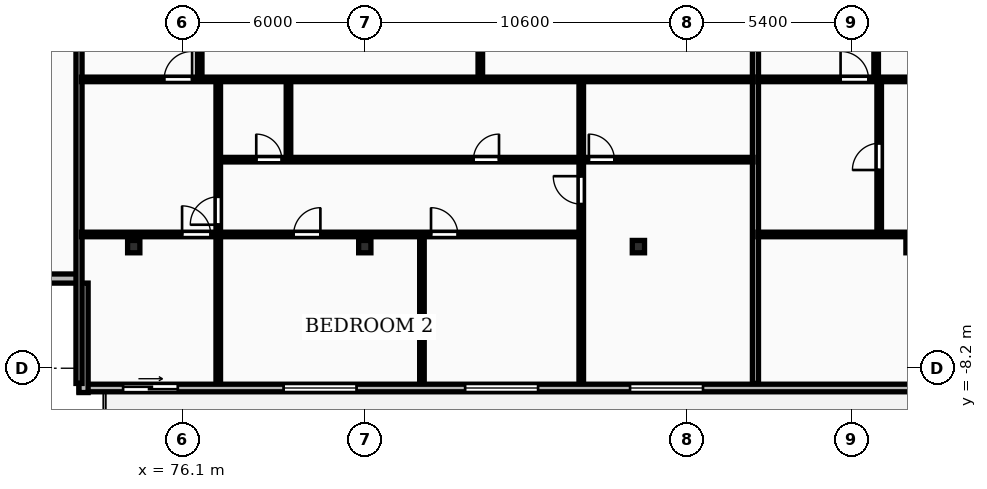
"""IFC4 building model, lengths in metres.
Left out: names, types, materials, properties, quantities, classifications, styles, units other than length and angle.
Written with IfcOpenShell. Run it as: python <this file> out.ifc"""

import sys

from ifc_helpers import new_model, si_unit, direction, frame, frame_2d, origin, origin_2d, place, context, subcontext, project, spatial, rectangle, i_section, extrude, element, fill, save


model = new_model("IFC4")
c1 = context("Model", 3, precision=1e-05, world=origin(), true_north=direction((0.0, 1.0)))
c2 = subcontext(c1, "Body", "Model", "MODEL_VIEW")
j1 = project(units=[si_unit("LENGTHUNIT", "METRE"), si_unit("PLANEANGLEUNIT", "RADIAN")], contexts=[c1])
p1 = place(None, origin())
s1 = spatial("IfcSite", under=j1, at=p1, CompositionType="ELEMENT")
p2 = place(p1, origin())
s2 = spatial("IfcBuilding", under=s1, at=p2, CompositionType="ELEMENT")
p3 = place(p2, frame((0.0, 0.0, 142.9)))
s3 = spatial("IfcBuildingStorey", under=s2, at=p3, CompositionType="ELEMENT", Elevation=142.9)
for number, where, z_axis, x_axis in (
    (1, (74.5, -4.2, 0.0), (0.0, 0.0, 1.0), (1.0, 0.0, 0.0)),
    (2, (82.1, -4.2, 0.0), (0.0, 0.0, 1.0), (1.0, 0.0, 0.0)),
    (3, (91.1, -4.2, 0.0), (0.0, 0.0, 1.0), (1.0, 0.0, 0.0)),
    (4, (100.1, -4.2, 0.0), (0.0, 0.0, 1.0), (1.0, 0.0, 0.0)),
):
    element("IfcColumn", number, at=place(p3, frame(where, z_axis=z_axis, x_axis=x_axis)), inside=s3, PredefinedType="COLUMN", context=c2, shape_type="SweptSolid", body=[
        extrude(i_section(OverallWidth=0.403, OverallDepth=0.406, WebThickness=0.027, FlangeThickness=0.043, FilletRadius=0.015, at=origin_2d()), origin(), (0.0, 0.0, 1.0), 3.6),
    ])
p4 = place(p3, frame((72.7, -8.85, 0.0), z_axis=(0.0, 0.0, 1.0), x_axis=(1.0, 0.0, 0.0)))
e5 = element("IfcWall", 5, at=p4, inside=s3, PredefinedType="STANDARD", context=c2, shape_type="SweptSolid", body=[
    extrude(rectangle(XDim=58.0, YDim=0.25, at=frame_2d((29.0, 0.0))), origin(), (0.0, 0.0, 1.0), 3.31),
])
p5 = place(p4, frame((6.73, 0.0, 0.85)))
e6 = element("IfcOpeningElement", 6, at=p5, cuts=e5, PredefinedType="OPENING", context=c2, shape_type="SweptSolid", body=[
    extrude(rectangle(XDim=2.4, YDim=1.9, at=frame_2d((1.2, 0.95))), frame((0.0, 0.135, 0.0), z_axis=(0.0, -1.0, 0.0), x_axis=(1.0, 0.0, 0.0)), (0.0, 0.0, 1.0), 0.27),
])
p6 = place(p4, frame((12.7, 0.0, 0.85)))
e7 = element("IfcOpeningElement", 7, at=p6, cuts=e5, PredefinedType="OPENING", context=c2, shape_type="SweptSolid", body=[
    extrude(rectangle(XDim=2.4, YDim=1.9, at=frame_2d((1.2, 0.95))), frame((0.0, 0.135, 0.0), z_axis=(0.0, -1.0, 0.0), x_axis=(1.0, 0.0, 0.0)), (0.0, 0.0, 1.0), 0.27),
])
p7 = place(p4, frame((1.45, 0.0, 0.0)))
e8 = element("IfcOpeningElement", 8, at=p7, cuts=e5, PredefinedType="OPENING", context=c2, shape_type="SweptSolid", body=[
    extrude(rectangle(XDim=1.8, YDim=2.2, at=frame_2d((0.9, 1.1))), frame((0.0, 0.135, 0.0), z_axis=(0.0, -1.0, 0.0), x_axis=(1.0, 0.0, 0.0)), (0.0, 0.0, 1.0), 0.27),
])
p8 = place(p4, frame((18.125, 0.0, 0.85)))
e9 = element("IfcOpeningElement", 9, at=p8, cuts=e5, PredefinedType="OPENING", context=c2, shape_type="SweptSolid", body=[
    extrude(rectangle(XDim=2.4, YDim=1.9, at=frame_2d((1.2, 0.95))), frame((0.0, 0.135, 0.0), z_axis=(0.0, -1.0, 0.0), x_axis=(1.0, 0.0, 0.0)), (0.0, 0.0, 1.0), 0.27),
])
p9 = place(p4, frame((27.429, 0.0, 0.0)))
e10 = element("IfcOpeningElement", 10, at=p9, cuts=e5, PredefinedType="OPENING", context=c2, shape_type="SweptSolid", body=[
    extrude(rectangle(XDim=1.8, YDim=2.2, at=frame_2d((0.9, 1.1))), frame((0.0, 0.135, 0.0), z_axis=(0.0, -1.0, 0.0), x_axis=(1.0, 0.0, 0.0)), (0.0, 0.0, 1.0), 0.27),
])
p10 = place(p4, frame((35.038, 0.0, 0.85)))
e11 = element("IfcOpeningElement", 11, at=p10, cuts=e5, PredefinedType="OPENING", context=c2, shape_type="SweptSolid", body=[
    extrude(rectangle(XDim=1.8, YDim=1.8, at=frame_2d((0.9, 0.9))), frame((0.0, 0.135, 0.0), z_axis=(0.0, -1.0, 0.0), x_axis=(1.0, 0.0, 0.0)), (0.0, 0.0, 1.0), 0.27),
])
p11 = place(p4, frame((44.124, 0.0, 0.85)))
e12 = element("IfcOpeningElement", 12, at=p11, cuts=e5, PredefinedType="OPENING", context=c2, shape_type="SweptSolid", body=[
    extrude(rectangle(XDim=2.4, YDim=1.9, at=frame_2d((1.2, 0.95))), frame((0.0, 0.135, 0.0), z_axis=(0.0, -1.0, 0.0), x_axis=(1.0, 0.0, 0.0)), (0.0, 0.0, 1.0), 0.27),
])
p12 = place(p4, frame((49.604, 0.0, 0.85)))
e13 = element("IfcOpeningElement", 13, at=p12, cuts=e5, PredefinedType="OPENING", context=c2, shape_type="SweptSolid", body=[
    extrude(rectangle(XDim=2.4, YDim=1.9, at=frame_2d((1.2, 0.95))), frame((0.0, 0.135, 0.0), z_axis=(0.0, -1.0, 0.0), x_axis=(1.0, 0.0, 0.0)), (0.0, 0.0, 1.0), 0.27),
])
p13 = place(p4, frame((39.368, 0.0, 0.0)))
e14 = element("IfcOpeningElement", 14, at=p13, cuts=e5, PredefinedType="OPENING", context=c2, shape_type="SweptSolid", body=[
    extrude(rectangle(XDim=1.8, YDim=2.2, at=frame_2d((0.9, 1.1))), frame((0.0, 0.135, 0.0), z_axis=(0.0, -1.0, 0.0), x_axis=(1.0, 0.0, 0.0)), (0.0, 0.0, 1.0), 0.27),
])
p14 = place(p4, frame((54.575, 0.0, 0.85)))
e15 = element("IfcOpeningElement", 15, at=p14, cuts=e5, PredefinedType="OPENING", context=c2, shape_type="SweptSolid", body=[
    extrude(rectangle(XDim=2.4, YDim=1.9, at=frame_2d((1.2, 0.95))), frame((0.0, 0.135, 0.0), z_axis=(0.0, -1.0, 0.0), x_axis=(1.0, 0.0, 0.0)), (0.0, 0.0, 1.0), 0.27),
])
p15 = place(p3, frame((69.1, -5.25, 0.0), z_axis=(0.0, 0.0, 1.0), x_axis=(1.0, 0.0, 0.0)))
e16 = element("IfcWall", 16, at=p15, inside=s3, PredefinedType="STANDARD", context=c2, shape_type="SweptSolid", body=[
    extrude(rectangle(XDim=3.6, YDim=0.3, at=frame_2d((1.8, 0.0))), origin(), (0.0, 0.0, 1.0), 3.31),
])
p16 = place(p3, frame((72.85, -5.4, 0.0), z_axis=(0.0, 0.0, 1.0), x_axis=(0.0, -1.0, 0.0)))
e17 = element("IfcWall", 17, at=p16, inside=s3, PredefinedType="STANDARD", context=c2, shape_type="SweptSolid", body=[
    extrude(rectangle(XDim=3.6, YDim=0.3, at=frame_2d((1.8, 0.0))), origin(), (0.0, 0.0, 1.0), 3.31),
])
for number, where, z_axis, x_axis in (
    (18, (72.7, -8.7, 0.0), (0.0, 0.0, 1.0), (0.0, 1.0, 0.0)),
    (19, (94.95, -8.7, 0.0), (0.0, 0.0, 1.0), (0.0, 1.0, 0.0)),
):
    element("IfcWall", number, at=place(p3, frame(where, z_axis=z_axis, x_axis=x_axis)), inside=s3, PredefinedType="PARTITIONING", context=c2, shape_type="SweptSolid", body=[
        extrude(rectangle(XDim=24.57, YDim=0.2, at=frame_2d((12.285, 0.0))), origin(), (0.0, 0.0, 1.0), 3.31),
    ])
p17 = place(p3, frame((85.9, 1.34, 0.0), z_axis=(0.0, 0.0, 1.0), x_axis=(0.0, 1.0, 0.0)))
e20 = element("IfcWall", 20, at=p17, inside=s3, PredefinedType="PARTITIONING", context=c2, shape_type="SweptSolid", body=[
    extrude(rectangle(XDim=14.55, YDim=0.15, at=frame_2d((7.275, 0.0))), origin(), (0.0, 0.0, 1.0), 3.31),
])
p18 = place(p17, frame((6.185, 0.0, 0.0)))
e21 = element("IfcOpeningElement", 21, at=p18, cuts=e20, PredefinedType="OPENING", context=c2, shape_type="SweptSolid", body=[
    extrude(rectangle(XDim=0.84, YDim=2.04, at=frame_2d((0.42, 1.02))), frame((0.0, 0.085, 0.0), z_axis=(0.0, -1.0, 0.0), x_axis=(1.0, 0.0, 0.0)), (0.0, 0.0, 1.0), 0.17),
])
p19 = place(p17, frame((7.525, 0.0, 0.0)))
e22 = element("IfcOpeningElement", 22, at=p19, cuts=e20, PredefinedType="OPENING", context=c2, shape_type="SweptSolid", body=[
    extrude(rectangle(XDim=0.88, YDim=2.06, at=frame_2d((0.44, 1.03))), frame((0.0, 0.085, 0.0), z_axis=(0.0, -1.0, 0.0), x_axis=(1.0, 0.0, 0.0)), (0.0, 0.0, 1.0), 0.17),
])
p20 = place(p3, frame((76.67, 1.34, 0.0), z_axis=(0.0, 0.0, 1.0), x_axis=(0.0, 1.0, 0.0)))
e23 = element("IfcWall", 23, at=p20, inside=s3, PredefinedType="PARTITIONING", context=c2, shape_type="SweptSolid", body=[
    extrude(rectangle(XDim=14.55, YDim=0.15, at=frame_2d((7.275, 0.0))), origin(), (0.0, 0.0, 1.0), 3.31),
])
p21 = place(p20, frame((3.132, 0.0, 0.0)))
e24 = element("IfcOpeningElement", 24, at=p21, cuts=e23, PredefinedType="OPENING", context=c2, shape_type="SweptSolid", body=[
    extrude(rectangle(XDim=0.88, YDim=2.06, at=frame_2d((0.44, 1.03))), frame((0.0, 0.085, 0.0), z_axis=(0.0, -1.0, 0.0), x_axis=(1.0, 0.0, 0.0)), (0.0, 0.0, 1.0), 0.17),
])
p22 = place(p3, frame((79.59, -1.32, 0.0), z_axis=(0.0, 0.0, 1.0), x_axis=(0.0, 1.0, 0.0)))
e25 = element("IfcWall", 25, at=p22, inside=s3, PredefinedType="PARTITIONING", context=c2, shape_type="SweptSolid", body=[
    extrude(rectangle(XDim=2.58, YDim=0.15, at=frame_2d((1.29, 0.0))), origin(), (0.0, 0.0, 1.0), 3.31),
])
p23 = place(p3, frame((83.98, -8.7, 0.0), z_axis=(0.0, 0.0, 1.0), x_axis=(0.0, 1.0, 0.0)))
e26 = element("IfcWall", 26, at=p23, inside=s3, PredefinedType="PARTITIONING", context=c2, shape_type="SweptSolid", body=[
    extrude(rectangle(XDim=4.82, YDim=0.15, at=frame_2d((2.41, 0.0))), origin(), (0.0, 0.0, 1.0), 3.31),
])
p24 = place(p3, frame((77.28, -8.7, 0.0), z_axis=(0.0, 0.0, 1.0), x_axis=(0.0, 1.0, 0.0)))
e27 = element("IfcWall", 27, at=p24, inside=s3, PredefinedType="PARTITIONING", context=c2, shape_type="SweptSolid", body=[
    extrude(rectangle(XDim=9.96, YDim=0.15, at=frame_2d((4.98, 0.0))), origin(), (0.0, 0.0, 1.0), 3.31),
])
p25 = place(p24, frame((5.22, 0.0, 0.0)))
e28 = element("IfcOpeningElement", 28, at=p25, cuts=e27, PredefinedType="OPENING", context=c2, shape_type="SweptSolid", body=[
    extrude(rectangle(XDim=0.92, YDim=2.08, at=frame_2d((0.46, 1.04))), frame((0.0, 0.085, 0.0), z_axis=(0.0, -1.0, 0.0), x_axis=(1.0, 0.0, 0.0)), (0.0, 0.0, 1.0), 0.17),
])
p26 = place(p3, frame((89.22, -1.32, 0.0), z_axis=(0.0, 0.0, 1.0), x_axis=(0.0, 1.0, 0.0)))
e29 = element("IfcWall", 29, at=p26, inside=s3, PredefinedType="PARTITIONING", context=c2, shape_type="SweptSolid", body=[
    extrude(rectangle(XDim=2.58, YDim=0.15, at=frame_2d((1.29, 0.0))), origin(), (0.0, 0.0, 1.0), 3.31),
])
p27 = place(p3, frame((89.22, -8.7, 0.0), z_axis=(0.0, 0.0, 1.0), x_axis=(0.0, 1.0, 0.0)))
e30 = element("IfcWall", 30, at=p27, inside=s3, PredefinedType="PARTITIONING", context=c2, shape_type="SweptSolid", body=[
    extrude(rectangle(XDim=7.34, YDim=0.15, at=frame_2d((3.67, 0.0))), origin(), (0.0, 0.0, 1.0), 3.31),
])
p28 = place(p27, frame((5.897, 0.0, 0.0)))
e31 = element("IfcOpeningElement", 31, at=p28, cuts=e30, PredefinedType="OPENING", context=c2, shape_type="SweptSolid", body=[
    extrude(rectangle(XDim=0.92, YDim=2.08, at=frame_2d((0.46, 1.04))), frame((0.0, 0.085, 0.0), z_axis=(0.0, -1.0, 0.0), x_axis=(1.0, 0.0, 0.0)), (0.0, 0.0, 1.0), 0.17),
])
p29 = place(p3, frame((77.32, -1.34, 0.0), z_axis=(0.0, 0.0, 1.0), x_axis=(1.0, 0.0, 0.0)))
e32 = element("IfcWall", 32, at=p29, inside=s3, PredefinedType="PARTITIONING", context=c2, shape_type="SweptSolid", body=[
    extrude(rectangle(XDim=17.55, YDim=0.15, at=frame_2d((8.775, 0.0))), origin(), (0.0, 0.0, 1.0), 3.31),
])
p30 = place(p29, frame((1.21, 0.0, 0.0)))
e33 = element("IfcOpeningElement", 33, at=p30, cuts=e32, PredefinedType="OPENING", context=c2, shape_type="SweptSolid", body=[
    extrude(rectangle(XDim=0.84, YDim=2.04, at=frame_2d((0.42, 1.02))), frame((0.0, 0.085, 0.0), z_axis=(0.0, -1.0, 0.0), x_axis=(1.0, 0.0, 0.0)), (0.0, 0.0, 1.0), 0.17),
])
p31 = place(p29, frame((8.355, 0.0, 0.0)))
e34 = element("IfcOpeningElement", 34, at=p31, cuts=e32, PredefinedType="OPENING", context=c2, shape_type="SweptSolid", body=[
    extrude(rectangle(XDim=0.84, YDim=2.04, at=frame_2d((0.42, 1.02))), frame((0.0, 0.085, 0.0), z_axis=(0.0, -1.0, 0.0), x_axis=(1.0, 0.0, 0.0)), (0.0, 0.0, 1.0), 0.17),
])
p32 = place(p29, frame((12.15, 0.0, 0.0)))
e35 = element("IfcOpeningElement", 35, at=p32, cuts=e32, PredefinedType="OPENING", context=c2, shape_type="SweptSolid", body=[
    extrude(rectangle(XDim=0.84, YDim=2.04, at=frame_2d((0.42, 1.02))), frame((0.0, 0.085, 0.0), z_axis=(0.0, -1.0, 0.0), x_axis=(1.0, 0.0, 0.0)), (0.0, 0.0, 1.0), 0.17),
])
p33 = place(p3, frame((72.78, 1.3, 0.0), z_axis=(0.0, 0.0, 1.0), x_axis=(1.0, 0.0, 0.0)))
e36 = element("IfcWall", 36, at=p33, inside=s3, PredefinedType="PARTITIONING", context=c2, shape_type="SweptSolid", body=[
    extrude(rectangle(XDim=22.09, YDim=0.15, at=frame_2d((11.045, 0.0))), origin(), (0.0, 0.0, 1.0), 3.31),
])
p34 = place(p33, frame((2.72, 0.0, 0.0)))
e37 = element("IfcOpeningElement", 37, at=p34, cuts=e36, PredefinedType="OPENING", context=c2, shape_type="SweptSolid", body=[
    extrude(rectangle(XDim=0.92, YDim=2.08, at=frame_2d((0.46, 1.04))), frame((0.0, 0.085, 0.0), z_axis=(0.0, -1.0, 0.0), x_axis=(1.0, 0.0, 0.0)), (0.0, 0.0, 1.0), 0.17),
])
p35 = place(p3, frame((72.78, -3.8, 0.0), z_axis=(0.0, 0.0, 1.0), x_axis=(1.0, 0.0, 0.0)))
e38 = element("IfcWall", 38, at=p35, inside=s3, PredefinedType="PARTITIONING", context=c2, shape_type="SweptSolid", body=[
    extrude(rectangle(XDim=16.44, YDim=0.15, at=frame_2d((8.22, 0.0))), origin(), (0.0, 0.0, 1.0), 3.31),
])
p36 = place(p35, frame((3.31, 0.0, 0.0)))
e39 = element("IfcOpeningElement", 39, at=p36, cuts=e38, PredefinedType="OPENING", context=c2, shape_type="SweptSolid", body=[
    extrude(rectangle(XDim=0.94, YDim=2.1, at=frame_2d((0.47, 1.05))), frame((0.0, 0.085, 0.0), z_axis=(0.0, -1.0, 0.0), x_axis=(1.0, 0.0, 0.0)), (0.0, 0.0, 1.0), 0.17),
])
p37 = place(p35, frame((6.979, 0.0, 0.0)))
e40 = element("IfcOpeningElement", 40, at=p37, cuts=e38, PredefinedType="OPENING", context=c2, shape_type="SweptSolid", body=[
    extrude(rectangle(XDim=0.88, YDim=2.06, at=frame_2d((0.44, 1.03))), frame((0.0, 0.085, 0.0), z_axis=(0.0, -1.0, 0.0), x_axis=(1.0, 0.0, 0.0)), (0.0, 0.0, 1.0), 0.17),
])
p38 = place(p35, frame((11.498, 0.0, 0.0)))
e41 = element("IfcOpeningElement", 41, at=p38, cuts=e38, PredefinedType="OPENING", context=c2, shape_type="SweptSolid", body=[
    extrude(rectangle(XDim=0.88, YDim=2.06, at=frame_2d((0.44, 1.03))), frame((0.0, 0.085, 0.0), z_axis=(0.0, -1.0, 0.0), x_axis=(1.0, 0.0, 0.0)), (0.0, 0.0, 1.0), 0.17),
])
p39 = place(p3, frame((98.92, 1.34, 0.0), z_axis=(0.0, 0.0, 1.0), x_axis=(0.0, 1.0, 0.0)))
e42 = element("IfcWall", 42, at=p39, inside=s3, PredefinedType="PARTITIONING", context=c2, shape_type="SweptSolid", body=[
    extrude(rectangle(XDim=14.55, YDim=0.15, at=frame_2d((7.275, 0.0))), origin(), (0.0, 0.0, 1.0), 3.31),
])
p40 = place(p39, frame((3.098, 0.0, 0.0)))
e43 = element("IfcOpeningElement", 43, at=p40, cuts=e42, PredefinedType="OPENING", context=c2, shape_type="SweptSolid", body=[
    extrude(rectangle(XDim=0.88, YDim=2.06, at=frame_2d((0.44, 1.03))), frame((0.0, 0.085, 0.0), z_axis=(0.0, -1.0, 0.0), x_axis=(1.0, 0.0, 0.0)), (0.0, 0.0, 1.0), 0.17),
])
p41 = place(p3, frame((99.02, -3.74, 0.0), z_axis=(0.0, 0.0, 1.0), x_axis=(0.0, 1.0, 0.0)))
e44 = element("IfcWall", 44, at=p41, inside=s3, PredefinedType="PARTITIONING", context=c2, shape_type="SweptSolid", body=[
    extrude(rectangle(XDim=5.0, YDim=0.15, at=frame_2d((2.5, 0.0))), origin(), (0.0, 0.0, 1.0), 3.31),
])
p42 = place(p41, frame((2.06, 0.0, 0.0)))
e45 = element("IfcOpeningElement", 45, at=p42, cuts=e44, PredefinedType="OPENING", context=c2, shape_type="SweptSolid", body=[
    extrude(rectangle(XDim=0.88, YDim=2.06, at=frame_2d((0.44, 1.03))), frame((0.0, 0.085, 0.0), z_axis=(0.0, -1.0, 0.0), x_axis=(1.0, 0.0, 0.0)), (0.0, 0.0, 1.0), 0.17),
])
p43 = place(p3, frame((95.03, 1.3, 0.0), z_axis=(0.0, 0.0, 1.0), x_axis=(1.0, 0.0, 0.0)))
e46 = element("IfcWall", 46, at=p43, inside=s3, PredefinedType="PARTITIONING", context=c2, shape_type="SweptSolid", body=[
    extrude(rectangle(XDim=15.298, YDim=0.15, at=frame_2d((7.649, 0.0))), origin(), (0.0, 0.0, 1.0), 3.31),
])
p44 = place(p43, frame((2.72, 0.0, 0.0)))
e47 = element("IfcOpeningElement", 47, at=p44, cuts=e46, PredefinedType="OPENING", context=c2, shape_type="SweptSolid", body=[
    extrude(rectangle(XDim=0.92, YDim=2.08, at=frame_2d((0.46, 1.04))), frame((0.0, 0.085, 0.0), z_axis=(0.0, -1.0, 0.0), x_axis=(1.0, 0.0, 0.0)), (0.0, 0.0, 1.0), 0.17),
])
p45 = place(p3, frame((95.03, -3.8, 0.0), z_axis=(0.0, 0.0, 1.0), x_axis=(1.0, 0.0, 0.0)))
e48 = element("IfcWall", 48, at=p45, inside=s3, PredefinedType="PARTITIONING", context=c2, shape_type="SweptSolid", body=[
    extrude(rectangle(XDim=15.298, YDim=0.15, at=frame_2d((7.649, 0.0))), origin(), (0.0, 0.0, 1.0), 3.31),
])
p46 = place(p45, frame((7.179, 0.0, 0.0)))
e49 = element("IfcOpeningElement", 49, at=p46, cuts=e48, PredefinedType="OPENING", context=c2, shape_type="SweptSolid", body=[
    extrude(rectangle(XDim=0.94, YDim=2.1, at=frame_2d((0.47, 1.05))), frame((0.0, 0.085, 0.0), z_axis=(0.0, -1.0, 0.0), x_axis=(1.0, 0.0, 0.0)), (0.0, 0.0, 1.0), 0.17),
])
p47 = place(p5, origin())
e50 = element("IfcWindow", 50, at=p47, inside=s3, PartitioningType="DOUBLE_PANEL_VERTICAL", PredefinedType="WINDOW", context=c2, shape_type="SweptSolid", body=[
    extrude(rectangle(XDim=2.4, YDim=1.9, at=frame_2d((1.2, 0.95))), frame((0.0, 0.03, 0.0), z_axis=(0.0, -1.0, 0.0), x_axis=(1.0, 0.0, 0.0)), (0.0, 0.0, 1.0), 0.06),
])
fill(e6, e50)
p48 = place(p6, origin())
e51 = element("IfcWindow", 51, at=p48, inside=s3, PartitioningType="DOUBLE_PANEL_VERTICAL", PredefinedType="WINDOW", context=c2, shape_type="SweptSolid", body=[
    extrude(rectangle(XDim=2.4, YDim=1.9, at=frame_2d((1.2, 0.95))), frame((0.0, 0.03, 0.0), z_axis=(0.0, -1.0, 0.0), x_axis=(1.0, 0.0, 0.0)), (0.0, 0.0, 1.0), 0.06),
])
fill(e7, e51)
p49 = place(p7, origin())
e52 = element("IfcDoor", 52, at=p49, inside=s3, OperationType="SLIDING_TO_RIGHT", PredefinedType="DOOR", context=c2, shape_type="SweptSolid", body=[
    extrude(rectangle(XDim=1.8, YDim=2.2, at=frame_2d((0.9, 1.1))), frame((0.0, 0.025, 0.0), z_axis=(0.0, -1.0, 0.0), x_axis=(1.0, 0.0, 0.0)), (0.0, 0.0, 1.0), 0.05),
])
fill(e8, e52)
p50 = place(p8, origin())
e53 = element("IfcWindow", 53, at=p50, inside=s3, PartitioningType="DOUBLE_PANEL_VERTICAL", PredefinedType="WINDOW", context=c2, shape_type="SweptSolid", body=[
    extrude(rectangle(XDim=2.4, YDim=1.9, at=frame_2d((1.2, 0.95))), frame((0.0, 0.03, 0.0), z_axis=(0.0, -1.0, 0.0), x_axis=(1.0, 0.0, 0.0)), (0.0, 0.0, 1.0), 0.06),
])
fill(e9, e53)
p51 = place(p25, origin())
e54 = element("IfcDoor", 54, at=p51, inside=s3, OperationType="SINGLE_SWING_LEFT", PredefinedType="DOOR", context=c2, shape_type="SweptSolid", body=[
    extrude(rectangle(XDim=0.92, YDim=2.08, at=frame_2d((0.46, 1.04))), frame((0.0, 0.025, 0.0), z_axis=(0.0, -1.0, 0.0), x_axis=(1.0, 0.0, 0.0)), (0.0, 0.0, 1.0), 0.05),
])
fill(e28, e54)
p52 = place(p28, origin())
e55 = element("IfcDoor", 55, at=p52, inside=s3, OperationType="SINGLE_SWING_RIGHT", PredefinedType="DOOR", context=c2, shape_type="SweptSolid", body=[
    extrude(rectangle(XDim=0.92, YDim=2.08, at=frame_2d((0.46, 1.04))), frame((0.0, 0.025, 0.0), z_axis=(0.0, -1.0, 0.0), x_axis=(1.0, 0.0, 0.0)), (0.0, 0.0, 1.0), 0.05),
])
fill(e31, e55)
p53 = place(p30, origin())
e56 = element("IfcDoor", 56, at=p53, inside=s3, OperationType="SINGLE_SWING_LEFT", PredefinedType="DOOR", context=c2, shape_type="SweptSolid", body=[
    extrude(rectangle(XDim=0.84, YDim=2.04, at=frame_2d((0.42, 1.02))), frame((0.0, 0.025, 0.0), z_axis=(0.0, -1.0, 0.0), x_axis=(1.0, 0.0, 0.0)), (0.0, 0.0, 1.0), 0.05),
])
fill(e33, e56)
p54 = place(p31, origin())
e57 = element("IfcDoor", 57, at=p54, inside=s3, OperationType="SINGLE_SWING_RIGHT", PredefinedType="DOOR", context=c2, shape_type="SweptSolid", body=[
    extrude(rectangle(XDim=0.84, YDim=2.04, at=frame_2d((0.42, 1.02))), frame((0.0, 0.025, 0.0), z_axis=(0.0, -1.0, 0.0), x_axis=(1.0, 0.0, 0.0)), (0.0, 0.0, 1.0), 0.05),
])
fill(e34, e57)
p55 = place(p32, origin())
e58 = element("IfcDoor", 58, at=p55, inside=s3, OperationType="SINGLE_SWING_LEFT", PredefinedType="DOOR", context=c2, shape_type="SweptSolid", body=[
    extrude(rectangle(XDim=0.84, YDim=2.04, at=frame_2d((0.42, 1.02))), frame((0.0, 0.025, 0.0), z_axis=(0.0, -1.0, 0.0), x_axis=(1.0, 0.0, 0.0)), (0.0, 0.0, 1.0), 0.05),
])
fill(e35, e58)
p56 = place(p34, origin())
e59 = element("IfcDoor", 59, at=p56, inside=s3, OperationType="SINGLE_SWING_RIGHT", PredefinedType="DOOR", context=c2, shape_type="SweptSolid", body=[
    extrude(rectangle(XDim=0.92, YDim=2.08, at=frame_2d((0.46, 1.04))), frame((0.0, 0.025, 0.0), z_axis=(0.0, -1.0, 0.0), x_axis=(1.0, 0.0, 0.0)), (0.0, 0.0, 1.0), 0.05),
])
fill(e37, e59)
p57 = place(p36, origin())
e60 = element("IfcDoor", 60, at=p57, inside=s3, OperationType="SINGLE_SWING_LEFT", PredefinedType="DOOR", context=c2, shape_type="SweptSolid", body=[
    extrude(rectangle(XDim=0.94, YDim=2.1, at=frame_2d((0.47, 1.05))), frame((0.0, 0.025, 0.0), z_axis=(0.0, -1.0, 0.0), x_axis=(1.0, 0.0, 0.0)), (0.0, 0.0, 1.0), 0.05),
])
fill(e39, e60)
p58 = place(p37, origin())
e61 = element("IfcDoor", 61, at=p58, inside=s3, OperationType="SINGLE_SWING_RIGHT", PredefinedType="DOOR", context=c2, shape_type="SweptSolid", body=[
    extrude(rectangle(XDim=0.88, YDim=2.06, at=frame_2d((0.44, 1.03))), frame((0.0, 0.025, 0.0), z_axis=(0.0, -1.0, 0.0), x_axis=(1.0, 0.0, 0.0)), (0.0, 0.0, 1.0), 0.05),
])
fill(e40, e61)
p59 = place(p38, origin())
e62 = element("IfcDoor", 62, at=p59, inside=s3, OperationType="SINGLE_SWING_LEFT", PredefinedType="DOOR", context=c2, shape_type="SweptSolid", body=[
    extrude(rectangle(XDim=0.88, YDim=2.06, at=frame_2d((0.44, 1.03))), frame((0.0, 0.025, 0.0), z_axis=(0.0, -1.0, 0.0), x_axis=(1.0, 0.0, 0.0)), (0.0, 0.0, 1.0), 0.05),
])
fill(e41, e62)
p60 = place(p42, origin())
e63 = element("IfcDoor", 63, at=p60, inside=s3, OperationType="SINGLE_SWING_LEFT", PredefinedType="DOOR", context=c2, shape_type="SweptSolid", body=[
    extrude(rectangle(XDim=0.88, YDim=2.06, at=frame_2d((0.44, 1.03))), frame((0.0, 0.025, 0.0), z_axis=(0.0, -1.0, 0.0), x_axis=(1.0, 0.0, 0.0)), (0.0, 0.0, 1.0), 0.05),
])
fill(e45, e63)
p61 = place(p44, origin())
e64 = element("IfcDoor", 64, at=p61, inside=s3, OperationType="SINGLE_SWING_LEFT", PredefinedType="DOOR", context=c2, shape_type="SweptSolid", body=[
    extrude(rectangle(XDim=0.92, YDim=2.08, at=frame_2d((0.46, 1.04))), frame((0.0, 0.025, 0.0), z_axis=(0.0, -1.0, 0.0), x_axis=(1.0, 0.0, 0.0)), (0.0, 0.0, 1.0), 0.05),
])
fill(e47, e64)
save(model, sys.argv[1])
